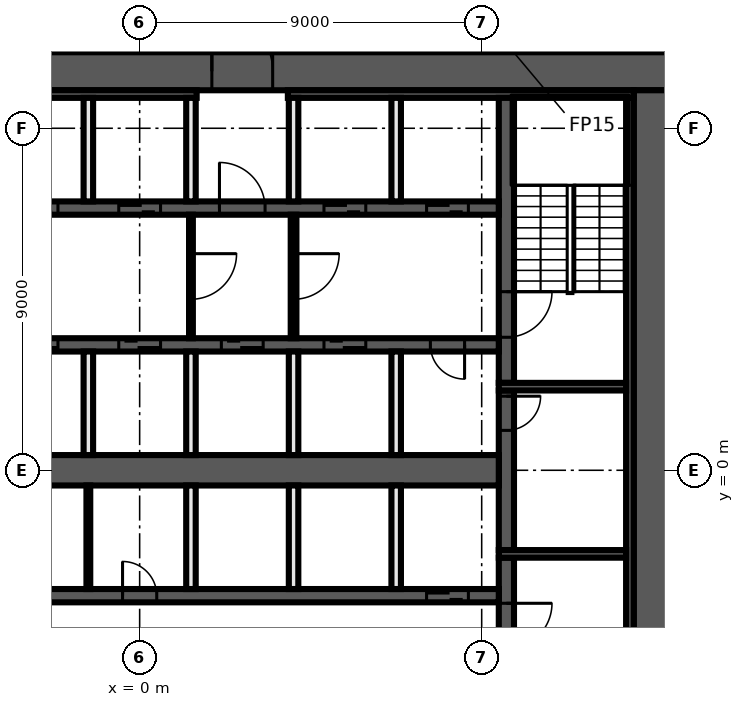
"""IFC4 building model, lengths in metres.
Left out: names, types, materials, properties, quantities, classifications, styles, units other than length and angle.
Written with IfcOpenShell. Run it as: python <this file> out.ifc"""

import sys

from ifc_helpers import new_model, si_unit, direction, frame, frame_2d, origin, place, context, subcontext, project, spatial, rectangle, extrude, element, fill, save


model = new_model("IFC4")
c1 = context("Model", 3, precision=1e-05, world=origin(), true_north=direction((0.0, 1.0)))
c2 = subcontext(c1, "Body", "Model", "MODEL_VIEW")
j1 = project(units=[si_unit("LENGTHUNIT", "METRE"), si_unit("PLANEANGLEUNIT", "RADIAN")], contexts=[c1])
p1 = place(None, origin())
s1 = spatial("IfcSite", under=j1, at=p1, CompositionType="ELEMENT")
p2 = place(p1, origin())
s2 = spatial("IfcBuilding", under=s1, at=p2, CompositionType="ELEMENT")
p3 = place(p2, frame((0.0, 0.0, 113.7)))
s3 = spatial("IfcBuildingStorey", under=s2, at=p3, CompositionType="ELEMENT", Elevation=113.7)
p4 = place(p3, frame((-14.0, 10.5, 0.0), z_axis=(0.0, 0.0, 1.0), x_axis=(1.0, 0.0, 0.0)))
e1 = element("IfcWall", 1, at=p4, inside=s3, PredefinedType="SHEAR", context=c2, shape_type="SweptSolid", body=[
    extrude(rectangle(XDim=28.0, YDim=1.0, at=frame_2d((14.0, 0.0))), origin(), (0.0, 0.0, 1.0), 3.3),
])
p5 = place(p4, frame((15.9, 0.0, 0.0)))
e2 = element("IfcOpeningElement", 2, at=p5, cuts=e1, PredefinedType="OPENING", context=c2, shape_type="SweptSolid", body=[
    extrude(rectangle(XDim=1.6, YDim=2.1, at=frame_2d((0.8, 1.05))), frame((0.0, 0.51, 0.0), z_axis=(0.0, -1.0, 0.0), x_axis=(1.0, 0.0, 0.0)), (0.0, 0.0, 1.0), 1.02),
])
p6 = place(p3, frame((13.5, 10.0, 0.0), z_axis=(0.0, 0.0, 1.0), x_axis=(0.0, -1.0, 0.0)))
e3 = element("IfcWall", 3, at=p6, inside=s3, PredefinedType="SHEAR", context=c2, shape_type="SweptSolid", body=[
    extrude(rectangle(XDim=20.0, YDim=1.0, at=frame_2d((10.0, 0.0))), origin(), (0.0, 0.0, 1.0), 3.3),
])
p7 = place(p3, frame((-13.0, 9.9, 0.0), z_axis=(0.0, 0.0, 1.0), x_axis=(1.0, 0.0, 0.0)))
e4 = element("IfcWall", 4, at=p7, inside=s3, PredefinedType="SHEAR", context=c2, shape_type="SweptSolid", body=[
    extrude(rectangle(XDim=14.5, YDim=0.2, at=frame_2d((7.25, 0.0))), origin(), (0.0, 0.0, 1.0), 3.3),
])
p8 = place(p3, frame((3.9, 9.9, 0.0), z_axis=(0.0, 0.0, 1.0), x_axis=(1.0, 0.0, 0.0)))
e5 = element("IfcWall", 5, at=p8, inside=s3, PredefinedType="SHEAR", context=c2, shape_type="SweptSolid", body=[
    extrude(rectangle(XDim=9.1, YDim=0.2, at=frame_2d((4.55, 0.0))), origin(), (0.0, 0.0, 1.0), 3.3),
])
p9 = place(p3, frame((12.9, 9.8, 0.0), z_axis=(0.0, 0.0, 1.0), x_axis=(0.0, -1.0, 0.0)))
e6 = element("IfcWall", 6, at=p9, inside=s3, PredefinedType="SHEAR", context=c2, shape_type="SweptSolid", body=[
    extrude(rectangle(XDim=19.6, YDim=0.2, at=frame_2d((9.8, 0.0))), origin(), (0.0, 0.0, 1.0), 3.3),
])
p10 = place(p3, frame((9.65, -2.3, 0.0), z_axis=(0.0, 0.0, 1.0), x_axis=(0.0, -1.0, 0.0)))
e7 = element("IfcWall", 7, at=p10, inside=s3, PredefinedType="SHEAR", context=c2, shape_type="SweptSolid", body=[
    extrude(rectangle(XDim=7.5, YDim=0.4, at=frame_2d((3.75, 0.0))), origin(), (0.0, 0.0, 1.0), 3.3),
])
p11 = place(p10, frame((1.2, 0.0, 0.0)))
e8 = element("IfcOpeningElement", 8, at=p11, cuts=e7, PredefinedType="OPENING", context=c2, shape_type="SweptSolid", body=[
    extrude(rectangle(XDim=1.2, YDim=2.1, at=frame_2d((0.6, 1.05))), frame((0.0, 0.21, 0.0), z_axis=(0.0, -1.0, 0.0), x_axis=(1.0, 0.0, 0.0)), (0.0, 0.0, 1.0), 0.42),
])
p12 = place(p3, frame((9.65, 2.1, 0.0), z_axis=(0.0, 0.0, 1.0), x_axis=(0.0, -1.0, 0.0)))
e9 = element("IfcWall", 9, at=p12, inside=s3, PredefinedType="SHEAR", context=c2, shape_type="SweptSolid", body=[
    extrude(rectangle(XDim=4.2, YDim=0.4, at=frame_2d((2.1, 0.0))), origin(), (0.0, 0.0, 1.0), 3.3),
])
p13 = place(p12, frame((0.15, 0.0, 0.0)))
e10 = element("IfcOpeningElement", 10, at=p13, cuts=e9, PredefinedType="OPENING", context=c2, shape_type="SweptSolid", body=[
    extrude(rectangle(XDim=0.9, YDim=2.1, at=frame_2d((0.45, 1.05))), frame((0.0, 0.21, 0.0), z_axis=(0.0, -1.0, 0.0), x_axis=(1.0, 0.0, 0.0)), (0.0, 0.0, 1.0), 0.42),
])
p14 = place(p3, frame((9.65, 9.8, 0.0), z_axis=(0.0, 0.0, 1.0), x_axis=(0.0, -1.0, 0.0)))
e11 = element("IfcWall", 11, at=p14, inside=s3, PredefinedType="SHEAR", context=c2, shape_type="SweptSolid", body=[
    extrude(rectangle(XDim=7.5, YDim=0.4, at=frame_2d((3.75, 0.0))), origin(), (0.0, 0.0, 1.0), 3.3),
])
p15 = place(p14, frame((5.1, 0.0, 0.0)))
e12 = element("IfcOpeningElement", 12, at=p15, cuts=e11, PredefinedType="OPENING", context=c2, shape_type="SweptSolid", body=[
    extrude(rectangle(XDim=1.2, YDim=2.1, at=frame_2d((0.6, 1.05))), frame((0.0, 0.21, 0.0), z_axis=(0.0, -1.0, 0.0), x_axis=(1.0, 0.0, 0.0)), (0.0, 0.0, 1.0), 0.42),
])
for number, where, z_axis, x_axis in (
    (13, (9.45, 2.2, 0.0), (0.0, 0.0, 1.0), (1.0, 0.0, 0.0)),
    (14, (9.45, -2.2, 0.0), (0.0, 0.0, 1.0), (1.0, 0.0, 0.0)),
):
    element("IfcWall", number, at=place(p3, frame(where, z_axis=z_axis, x_axis=x_axis)), inside=s3, PredefinedType="SHEAR", context=c2, shape_type="SweptSolid", body=[
        extrude(rectangle(XDim=3.35, YDim=0.2, at=frame_2d((1.675, 0.0))), origin(), (0.0, 0.0, 1.0), 3.3),
    ])
p16 = place(p3, frame((-9.45, 6.9, 0.0), z_axis=(0.0, 0.0, 1.0), x_axis=(1.0, 0.0, 0.0)))
e15 = element("IfcWall", 15, at=p16, inside=s3, PredefinedType="SHEAR", context=c2, shape_type="SweptSolid", body=[
    extrude(rectangle(XDim=18.9, YDim=0.35, at=frame_2d((9.45, 0.0))), origin(), (0.0, 0.0, 1.0), 3.3),
])
p17 = place(p16, frame((0.8, 0.0, 0.0)))
e16 = element("IfcOpeningElement", 16, at=p17, cuts=e15, PredefinedType="OPENING", context=c2, shape_type="SweptSolid", body=[
    extrude(rectangle(XDim=1.1, YDim=2.1, at=frame_2d((0.55, 1.05))), frame((0.0, 0.185, 0.0), z_axis=(0.0, -1.0, 0.0), x_axis=(1.0, 0.0, 0.0)), (0.0, 0.0, 1.0), 0.37),
])
p18 = place(p16, frame((3.5, 0.0, 0.0)))
e17 = element("IfcOpeningElement", 17, at=p18, cuts=e15, PredefinedType="OPENING", context=c2, shape_type="SweptSolid", body=[
    extrude(rectangle(XDim=1.1, YDim=2.1, at=frame_2d((0.55, 1.05))), frame((0.0, 0.185, 0.0), z_axis=(0.0, -1.0, 0.0), x_axis=(1.0, 0.0, 0.0)), (0.0, 0.0, 1.0), 0.37),
])
p19 = place(p16, frame((6.2, 0.0, 0.0)))
e18 = element("IfcOpeningElement", 18, at=p19, cuts=e15, PredefinedType="OPENING", context=c2, shape_type="SweptSolid", body=[
    extrude(rectangle(XDim=1.1, YDim=2.1, at=frame_2d((0.55, 1.05))), frame((0.0, 0.185, 0.0), z_axis=(0.0, -1.0, 0.0), x_axis=(1.0, 0.0, 0.0)), (0.0, 0.0, 1.0), 0.37),
])
p20 = place(p16, frame((8.9, 0.0, 0.0)))
e19 = element("IfcOpeningElement", 19, at=p20, cuts=e15, PredefinedType="OPENING", context=c2, shape_type="SweptSolid", body=[
    extrude(rectangle(XDim=1.1, YDim=2.1, at=frame_2d((0.55, 1.05))), frame((0.0, 0.185, 0.0), z_axis=(0.0, -1.0, 0.0), x_axis=(1.0, 0.0, 0.0)), (0.0, 0.0, 1.0), 0.37),
])
p21 = place(p16, frame((11.55, 0.0, 0.0)))
e20 = element("IfcOpeningElement", 20, at=p21, cuts=e15, PredefinedType="OPENING", context=c2, shape_type="SweptSolid", body=[
    extrude(rectangle(XDim=1.2, YDim=2.1, at=frame_2d((0.6, 1.05))), frame((0.0, 0.185, 0.0), z_axis=(0.0, -1.0, 0.0), x_axis=(1.0, 0.0, 0.0)), (0.0, 0.0, 1.0), 0.37),
])
p22 = place(p16, frame((14.3, 0.0, 0.0)))
e21 = element("IfcOpeningElement", 21, at=p22, cuts=e15, PredefinedType="OPENING", context=c2, shape_type="SweptSolid", body=[
    extrude(rectangle(XDim=1.1, YDim=2.1, at=frame_2d((0.55, 1.05))), frame((0.0, 0.185, 0.0), z_axis=(0.0, -1.0, 0.0), x_axis=(1.0, 0.0, 0.0)), (0.0, 0.0, 1.0), 0.37),
])
p23 = place(p16, frame((17.0, 0.0, 0.0)))
e22 = element("IfcOpeningElement", 22, at=p23, cuts=e15, PredefinedType="OPENING", context=c2, shape_type="SweptSolid", body=[
    extrude(rectangle(XDim=1.1, YDim=2.1, at=frame_2d((0.55, 1.05))), frame((0.0, 0.185, 0.0), z_axis=(0.0, -1.0, 0.0), x_axis=(1.0, 0.0, 0.0)), (0.0, 0.0, 1.0), 0.37),
])
p24 = place(p3, frame((9.45, 3.3, 0.0), z_axis=(0.0, 0.0, 1.0), x_axis=(-1.0, 0.0, 0.0)))
e23 = element("IfcWall", 23, at=p24, inside=s3, PredefinedType="SHEAR", context=c2, shape_type="SweptSolid", body=[
    extrude(rectangle(XDim=18.9, YDim=0.35, at=frame_2d((9.45, 0.0))), origin(), (0.0, 0.0, 1.0), 3.3),
])
p25 = place(p24, frame((17.0, 0.0, 0.0)))
e24 = element("IfcOpeningElement", 24, at=p25, cuts=e23, PredefinedType="OPENING", context=c2, shape_type="SweptSolid", body=[
    extrude(rectangle(XDim=1.1, YDim=2.1, at=frame_2d((0.55, 1.05))), frame((0.0, 0.185, 0.0), z_axis=(0.0, -1.0, 0.0), x_axis=(1.0, 0.0, 0.0)), (0.0, 0.0, 1.0), 0.37),
])
p26 = place(p24, frame((14.3, 0.0, 0.0)))
e25 = element("IfcOpeningElement", 25, at=p26, cuts=e23, PredefinedType="OPENING", context=c2, shape_type="SweptSolid", body=[
    extrude(rectangle(XDim=1.1, YDim=2.1, at=frame_2d((0.55, 1.05))), frame((0.0, 0.185, 0.0), z_axis=(0.0, -1.0, 0.0), x_axis=(1.0, 0.0, 0.0)), (0.0, 0.0, 1.0), 0.37),
])
p27 = place(p24, frame((11.6, 0.0, 0.0)))
e26 = element("IfcOpeningElement", 26, at=p27, cuts=e23, PredefinedType="OPENING", context=c2, shape_type="SweptSolid", body=[
    extrude(rectangle(XDim=1.1, YDim=2.1, at=frame_2d((0.55, 1.05))), frame((0.0, 0.185, 0.0), z_axis=(0.0, -1.0, 0.0), x_axis=(1.0, 0.0, 0.0)), (0.0, 0.0, 1.0), 0.37),
])
p28 = place(p24, frame((8.9, 0.0, 0.0)))
e27 = element("IfcOpeningElement", 27, at=p28, cuts=e23, PredefinedType="OPENING", context=c2, shape_type="SweptSolid", body=[
    extrude(rectangle(XDim=1.1, YDim=2.1, at=frame_2d((0.55, 1.05))), frame((0.0, 0.185, 0.0), z_axis=(0.0, -1.0, 0.0), x_axis=(1.0, 0.0, 0.0)), (0.0, 0.0, 1.0), 0.37),
])
p29 = place(p24, frame((6.2, 0.0, 0.0)))
e28 = element("IfcOpeningElement", 28, at=p29, cuts=e23, PredefinedType="OPENING", context=c2, shape_type="SweptSolid", body=[
    extrude(rectangle(XDim=1.1, YDim=2.1, at=frame_2d((0.55, 1.05))), frame((0.0, 0.185, 0.0), z_axis=(0.0, -1.0, 0.0), x_axis=(1.0, 0.0, 0.0)), (0.0, 0.0, 1.0), 0.37),
])
p30 = place(p24, frame((3.5, 0.0, 0.0)))
e29 = element("IfcOpeningElement", 29, at=p30, cuts=e23, PredefinedType="OPENING", context=c2, shape_type="SweptSolid", body=[
    extrude(rectangle(XDim=1.1, YDim=2.1, at=frame_2d((0.55, 1.05))), frame((0.0, 0.185, 0.0), z_axis=(0.0, -1.0, 0.0), x_axis=(1.0, 0.0, 0.0)), (0.0, 0.0, 1.0), 0.37),
])
p31 = place(p24, frame((0.9, 0.0, 0.0)))
e30 = element("IfcOpeningElement", 30, at=p31, cuts=e23, PredefinedType="OPENING", context=c2, shape_type="SweptSolid", body=[
    extrude(rectangle(XDim=0.9, YDim=2.1, at=frame_2d((0.45, 1.05))), frame((0.0, 0.185, 0.0), z_axis=(0.0, -1.0, 0.0), x_axis=(1.0, 0.0, 0.0)), (0.0, 0.0, 1.0), 0.37),
])
p32 = place(p3, frame((-9.45, -3.3, 0.0), z_axis=(0.0, 0.0, 1.0), x_axis=(1.0, 0.0, 0.0)))
e31 = element("IfcWall", 31, at=p32, inside=s3, PredefinedType="SHEAR", context=c2, shape_type="SweptSolid", body=[
    extrude(rectangle(XDim=18.9, YDim=0.35, at=frame_2d((9.45, 0.0))), origin(), (0.0, 0.0, 1.0), 3.3),
])
p33 = place(p32, frame((17.0, 0.0, 0.0)))
e32 = element("IfcOpeningElement", 32, at=p33, cuts=e31, PredefinedType="OPENING", context=c2, shape_type="SweptSolid", body=[
    extrude(rectangle(XDim=1.1, YDim=2.1, at=frame_2d((0.55, 1.05))), frame((0.0, 0.185, 0.0), z_axis=(0.0, -1.0, 0.0), x_axis=(1.0, 0.0, 0.0)), (0.0, 0.0, 1.0), 0.37),
])
p34 = place(p32, frame((3.6, 0.0, 0.0)))
e33 = element("IfcOpeningElement", 33, at=p34, cuts=e31, PredefinedType="OPENING", context=c2, shape_type="SweptSolid", body=[
    extrude(rectangle(XDim=0.9, YDim=2.1, at=frame_2d((0.45, 1.05))), frame((0.0, 0.185, 0.0), z_axis=(0.0, -1.0, 0.0), x_axis=(1.0, 0.0, 0.0)), (0.0, 0.0, 1.0), 0.37),
])
p35 = place(p32, frame((9.0, 0.0, 0.0)))
e34 = element("IfcOpeningElement", 34, at=p35, cuts=e31, PredefinedType="OPENING", context=c2, shape_type="SweptSolid", body=[
    extrude(rectangle(XDim=0.9, YDim=2.1, at=frame_2d((0.45, 1.05))), frame((0.0, 0.185, 0.0), z_axis=(0.0, -1.0, 0.0), x_axis=(1.0, 0.0, 0.0)), (0.0, 0.0, 1.0), 0.37),
])
p36 = place(p3, frame((-9.45, 0.0, 0.0), z_axis=(0.0, 0.0, 1.0), x_axis=(1.0, 0.0, 0.0)))
e35 = element("IfcWall", 35, at=p36, inside=s3, PredefinedType="SHEAR", context=c2, shape_type="SweptSolid", body=[
    extrude(rectangle(XDim=18.9, YDim=0.8, at=frame_2d((9.45, 0.0))), origin(), (0.0, 0.0, 1.0), 3.3),
])
for number, where, z_axis, x_axis in (
    (36, (6.75, -3.125, 0.0), (0.0, 0.0, 1.0), (0.0, 1.0, 0.0)),
    (37, (6.75, 0.4, 0.0), (0.0, 0.0, 1.0), (0.0, 1.0, 0.0)),
    (38, (6.75, 7.075, 0.0), (0.0, 0.0, 1.0), (0.0, 1.0, 0.0)),
):
    element("IfcWall", number, at=place(p3, frame(where, z_axis=z_axis, x_axis=x_axis)), inside=s3, PredefinedType="SOLIDWALL", context=c2, shape_type="SweptSolid", body=[
        extrude(rectangle(XDim=2.725, YDim=0.25, at=frame_2d((1.363, 0.0))), origin(), (0.0, 0.0, 1.0), 3.3),
    ])
p37 = place(p3, frame((4.05, 6.725, 0.0), z_axis=(0.0, 0.0, 1.0), x_axis=(0.0, -1.0, 0.0)))
e39 = element("IfcWall", 39, at=p37, inside=s3, PredefinedType="PARTITIONING", context=c2, shape_type="SweptSolid", body=[
    extrude(rectangle(XDim=3.25, YDim=0.15, at=frame_2d((1.625, 0.0))), origin(), (0.0, 0.0, 1.0), 3.3),
])
p38 = place(p37, frame((1.025, 0.0, 0.0)))
e40 = element("IfcOpeningElement", 40, at=p38, cuts=e39, PredefinedType="OPENING", context=c2, shape_type="SweptSolid", body=[
    extrude(rectangle(XDim=1.2, YDim=2.1, at=frame_2d((0.6, 1.05))), frame((0.0, 0.085, 0.0), z_axis=(0.0, -1.0, 0.0), x_axis=(1.0, 0.0, 0.0)), (0.0, 0.0, 1.0), 0.17),
])
for number, where, z_axis, x_axis in (
    (41, (4.05, -3.125, 0.0), (0.0, 0.0, 1.0), (0.0, 1.0, 0.0)),
    (42, (4.05, 0.4, 0.0), (0.0, 0.0, 1.0), (0.0, 1.0, 0.0)),
    (43, (4.05, 7.075, 0.0), (0.0, 0.0, 1.0), (0.0, 1.0, 0.0)),
):
    element("IfcWall", number, at=place(p3, frame(where, z_axis=z_axis, x_axis=x_axis)), inside=s3, PredefinedType="SOLIDWALL", context=c2, shape_type="SweptSolid", body=[
        extrude(rectangle(XDim=2.725, YDim=0.25, at=frame_2d((1.363, 0.0))), origin(), (0.0, 0.0, 1.0), 3.3),
    ])
p39 = place(p3, frame((1.35, 6.725, 0.0), z_axis=(0.0, 0.0, 1.0), x_axis=(0.0, -1.0, 0.0)))
e44 = element("IfcWall", 44, at=p39, inside=s3, PredefinedType="PARTITIONING", context=c2, shape_type="SweptSolid", body=[
    extrude(rectangle(XDim=3.25, YDim=0.1, at=frame_2d((1.625, 0.0))), origin(), (0.0, 0.0, 1.0), 3.3),
])
p40 = place(p39, frame((1.025, 0.0, 0.0)))
e45 = element("IfcOpeningElement", 45, at=p40, cuts=e44, PredefinedType="OPENING", context=c2, shape_type="SweptSolid", body=[
    extrude(rectangle(XDim=1.2, YDim=2.1, at=frame_2d((0.6, 1.05))), frame((0.0, 0.06, 0.0), z_axis=(0.0, -1.0, 0.0), x_axis=(1.0, 0.0, 0.0)), (0.0, 0.0, 1.0), 0.12),
])
for number, where, z_axis, x_axis in (
    (46, (1.35, -3.125, 0.0), (0.0, 0.0, 1.0), (0.0, 1.0, 0.0)),
    (47, (1.35, 0.4, 0.0), (0.0, 0.0, 1.0), (0.0, 1.0, 0.0)),
    (48, (1.35, 7.075, 0.0), (0.0, 0.0, 1.0), (0.0, 1.0, 0.0)),
):
    element("IfcWall", number, at=place(p3, frame(where, z_axis=z_axis, x_axis=x_axis)), inside=s3, PredefinedType="SOLIDWALL", context=c2, shape_type="SweptSolid", body=[
        extrude(rectangle(XDim=2.725, YDim=0.25, at=frame_2d((1.363, 0.0))), origin(), (0.0, 0.0, 1.0), 3.3),
    ])
p41 = place(p3, frame((-1.35, -3.125, 0.0), z_axis=(0.0, 0.0, 1.0), x_axis=(0.0, 1.0, 0.0)))
e49 = element("IfcWall", 49, at=p41, inside=s3, PredefinedType="PARTITIONING", context=c2, shape_type="SweptSolid", body=[
    extrude(rectangle(XDim=2.725, YDim=0.1, at=frame_2d((1.363, 0.0))), origin(), (0.0, 0.0, 1.0), 3.3),
])
for number, where, z_axis, x_axis in (
    (50, (-1.35, 0.4, 0.0), (0.0, 0.0, 1.0), (0.0, 1.0, 0.0)),
    (51, (-1.35, 7.075, 0.0), (0.0, 0.0, 1.0), (0.0, 1.0, 0.0)),
):
    element("IfcWall", number, at=place(p3, frame(where, z_axis=z_axis, x_axis=x_axis)), inside=s3, PredefinedType="SOLIDWALL", context=c2, shape_type="SweptSolid", body=[
        extrude(rectangle(XDim=2.725, YDim=0.25, at=frame_2d((1.363, 0.0))), origin(), (0.0, 0.0, 1.0), 3.3),
    ])
p42 = place(p13, origin())
e52 = element("IfcDoor", 52, at=p42, inside=s3, OperationType="SINGLE_SWING_RIGHT", PredefinedType="DOOR", context=c2, shape_type="SweptSolid", body=[
    extrude(rectangle(XDim=0.9, YDim=2.1, at=frame_2d((0.45, 1.05))), frame((0.0, 0.025, 0.0), z_axis=(0.0, -1.0, 0.0), x_axis=(1.0, 0.0, 0.0)), (0.0, 0.0, 1.0), 0.05),
])
fill(e10, e52)
p43 = place(p19, origin())
e53 = element("IfcDoor", 53, at=p43, inside=s3, OperationType="DOUBLE_DOOR_SLIDING", PredefinedType="DOOR", context=c2, shape_type="SweptSolid", body=[
    extrude(rectangle(XDim=1.1, YDim=2.1, at=frame_2d((0.55, 1.05))), frame((0.0, 0.025, 0.0), z_axis=(0.0, -1.0, 0.0), x_axis=(1.0, 0.0, 0.0)), (0.0, 0.0, 1.0), 0.05),
])
fill(e18, e53)
p44 = place(p20, origin())
e54 = element("IfcDoor", 54, at=p44, inside=s3, OperationType="DOUBLE_DOOR_SLIDING", PredefinedType="DOOR", context=c2, shape_type="SweptSolid", body=[
    extrude(rectangle(XDim=1.1, YDim=2.1, at=frame_2d((0.55, 1.05))), frame((0.0, 0.025, 0.0), z_axis=(0.0, -1.0, 0.0), x_axis=(1.0, 0.0, 0.0)), (0.0, 0.0, 1.0), 0.05),
])
fill(e19, e54)
p45 = place(p5, origin())
e55 = element("IfcDoor", 55, at=p45, inside=s3, OperationType="DOUBLE_DOOR_SINGLE_SWING", PredefinedType="DOOR", context=c2, shape_type="SweptSolid", body=[
    extrude(rectangle(XDim=1.6, YDim=2.1, at=frame_2d((0.8, 1.05))), frame((0.0, 0.025, 0.0), z_axis=(0.0, -1.0, 0.0), x_axis=(1.0, 0.0, 0.0)), (0.0, 0.0, 1.0), 0.05),
])
fill(e2, e55)
p46 = place(p21, origin())
e56 = element("IfcDoor", 56, at=p46, inside=s3, OperationType="SINGLE_SWING_LEFT", PredefinedType="DOOR", context=c2, shape_type="SweptSolid", body=[
    extrude(rectangle(XDim=1.2, YDim=2.1, at=frame_2d((0.6, 1.05))), frame((0.0, 0.025, 0.0), z_axis=(0.0, -1.0, 0.0), x_axis=(1.0, 0.0, 0.0)), (0.0, 0.0, 1.0), 0.05),
])
fill(e20, e56)
p47 = place(p22, origin())
e57 = element("IfcDoor", 57, at=p47, inside=s3, OperationType="DOUBLE_DOOR_SLIDING", PredefinedType="DOOR", context=c2, shape_type="SweptSolid", body=[
    extrude(rectangle(XDim=1.1, YDim=2.1, at=frame_2d((0.55, 1.05))), frame((0.0, 0.025, 0.0), z_axis=(0.0, -1.0, 0.0), x_axis=(1.0, 0.0, 0.0)), (0.0, 0.0, 1.0), 0.05),
])
fill(e21, e57)
p48 = place(p23, origin())
e58 = element("IfcDoor", 58, at=p48, inside=s3, OperationType="DOUBLE_DOOR_SLIDING", PredefinedType="DOOR", context=c2, shape_type="SweptSolid", body=[
    extrude(rectangle(XDim=1.1, YDim=2.1, at=frame_2d((0.55, 1.05))), frame((0.0, 0.025, 0.0), z_axis=(0.0, -1.0, 0.0), x_axis=(1.0, 0.0, 0.0)), (0.0, 0.0, 1.0), 0.05),
])
fill(e22, e58)
p49 = place(p27, origin())
e59 = element("IfcDoor", 59, at=p49, inside=s3, OperationType="DOUBLE_DOOR_SLIDING", PredefinedType="DOOR", context=c2, shape_type="SweptSolid", body=[
    extrude(rectangle(XDim=1.1, YDim=2.1, at=frame_2d((0.55, 1.05))), frame((0.0, 0.025, 0.0), z_axis=(0.0, -1.0, 0.0), x_axis=(1.0, 0.0, 0.0)), (0.0, 0.0, 1.0), 0.05),
])
fill(e26, e59)
p50 = place(p28, origin())
e60 = element("IfcDoor", 60, at=p50, inside=s3, OperationType="DOUBLE_DOOR_SLIDING", PredefinedType="DOOR", context=c2, shape_type="SweptSolid", body=[
    extrude(rectangle(XDim=1.1, YDim=2.1, at=frame_2d((0.55, 1.05))), frame((0.0, 0.025, 0.0), z_axis=(0.0, -1.0, 0.0), x_axis=(1.0, 0.0, 0.0)), (0.0, 0.0, 1.0), 0.05),
])
fill(e27, e60)
p51 = place(p29, origin())
e61 = element("IfcDoor", 61, at=p51, inside=s3, OperationType="DOUBLE_DOOR_SLIDING", PredefinedType="DOOR", context=c2, shape_type="SweptSolid", body=[
    extrude(rectangle(XDim=1.1, YDim=2.1, at=frame_2d((0.55, 1.05))), frame((0.0, 0.025, 0.0), z_axis=(0.0, -1.0, 0.0), x_axis=(1.0, 0.0, 0.0)), (0.0, 0.0, 1.0), 0.05),
])
fill(e28, e61)
p52 = place(p30, origin())
e62 = element("IfcDoor", 62, at=p52, inside=s3, OperationType="DOUBLE_DOOR_SLIDING", PredefinedType="DOOR", context=c2, shape_type="SweptSolid", body=[
    extrude(rectangle(XDim=1.1, YDim=2.1, at=frame_2d((0.55, 1.05))), frame((0.0, 0.025, 0.0), z_axis=(0.0, -1.0, 0.0), x_axis=(1.0, 0.0, 0.0)), (0.0, 0.0, 1.0), 0.05),
])
fill(e29, e62)
p53 = place(p31, origin())
e63 = element("IfcDoor", 63, at=p53, inside=s3, OperationType="SINGLE_SWING_LEFT", PredefinedType="DOOR", context=c2, shape_type="SweptSolid", body=[
    extrude(rectangle(XDim=0.9, YDim=2.1, at=frame_2d((0.45, 1.05))), frame((0.0, 0.025, 0.0), z_axis=(0.0, -1.0, 0.0), x_axis=(1.0, 0.0, 0.0)), (0.0, 0.0, 1.0), 0.05),
])
fill(e30, e63)
p54 = place(p33, origin())
e64 = element("IfcDoor", 64, at=p54, inside=s3, OperationType="DOUBLE_DOOR_SLIDING", PredefinedType="DOOR", context=c2, shape_type="SweptSolid", body=[
    extrude(rectangle(XDim=1.1, YDim=2.1, at=frame_2d((0.55, 1.05))), frame((0.0, 0.025, 0.0), z_axis=(0.0, -1.0, 0.0), x_axis=(1.0, 0.0, 0.0)), (0.0, 0.0, 1.0), 0.05),
])
fill(e32, e64)
p55 = place(p35, origin())
e65 = element("IfcDoor", 65, at=p55, inside=s3, OperationType="SINGLE_SWING_LEFT", PredefinedType="DOOR", context=c2, shape_type="SweptSolid", body=[
    extrude(rectangle(XDim=0.9, YDim=2.1, at=frame_2d((0.45, 1.05))), frame((0.0, 0.025, 0.0), z_axis=(0.0, -1.0, 0.0), x_axis=(1.0, 0.0, 0.0)), (0.0, 0.0, 1.0), 0.05),
])
fill(e34, e65)
p56 = place(p15, origin())
e66 = element("IfcDoor", 66, at=p56, inside=s3, OperationType="SINGLE_SWING_LEFT", PredefinedType="DOOR", context=c2, shape_type="SweptSolid", body=[
    extrude(rectangle(XDim=1.2, YDim=2.1, at=frame_2d((0.6, 1.05))), frame((0.0, 0.025, 0.0), z_axis=(0.0, -1.0, 0.0), x_axis=(1.0, 0.0, 0.0)), (0.0, 0.0, 1.0), 0.05),
])
fill(e12, e66)
p57 = place(p11, origin())
e67 = element("IfcDoor", 67, at=p57, inside=s3, OperationType="SINGLE_SWING_RIGHT", PredefinedType="DOOR", context=c2, shape_type="SweptSolid", body=[
    extrude(rectangle(XDim=1.2, YDim=2.1, at=frame_2d((0.6, 1.05))), frame((0.0, 0.025, 0.0), z_axis=(0.0, -1.0, 0.0), x_axis=(1.0, 0.0, 0.0)), (0.0, 0.0, 1.0), 0.05),
])
fill(e8, e67)
p58 = place(p40, origin())
e68 = element("IfcDoor", 68, at=p58, inside=s3, OperationType="SINGLE_SWING_LEFT", PredefinedType="DOOR", context=c2, shape_type="SweptSolid", body=[
    extrude(rectangle(XDim=1.2, YDim=2.1, at=frame_2d((0.6, 1.05))), frame((0.0, 0.025, 0.0), z_axis=(0.0, -1.0, 0.0), x_axis=(1.0, 0.0, 0.0)), (0.0, 0.0, 1.0), 0.05),
])
fill(e45, e68)
p59 = place(p38, origin())
e69 = element("IfcDoor", 69, at=p59, inside=s3, OperationType="SINGLE_SWING_RIGHT", PredefinedType="DOOR", context=c2, shape_type="SweptSolid", body=[
    extrude(rectangle(XDim=1.2, YDim=2.1, at=frame_2d((0.6, 1.05))), frame((0.0, 0.025, 0.0), z_axis=(0.0, -1.0, 0.0), x_axis=(1.0, 0.0, 0.0)), (0.0, 0.0, 1.0), 0.05),
])
fill(e40, e69)
save(model, sys.argv[1])
